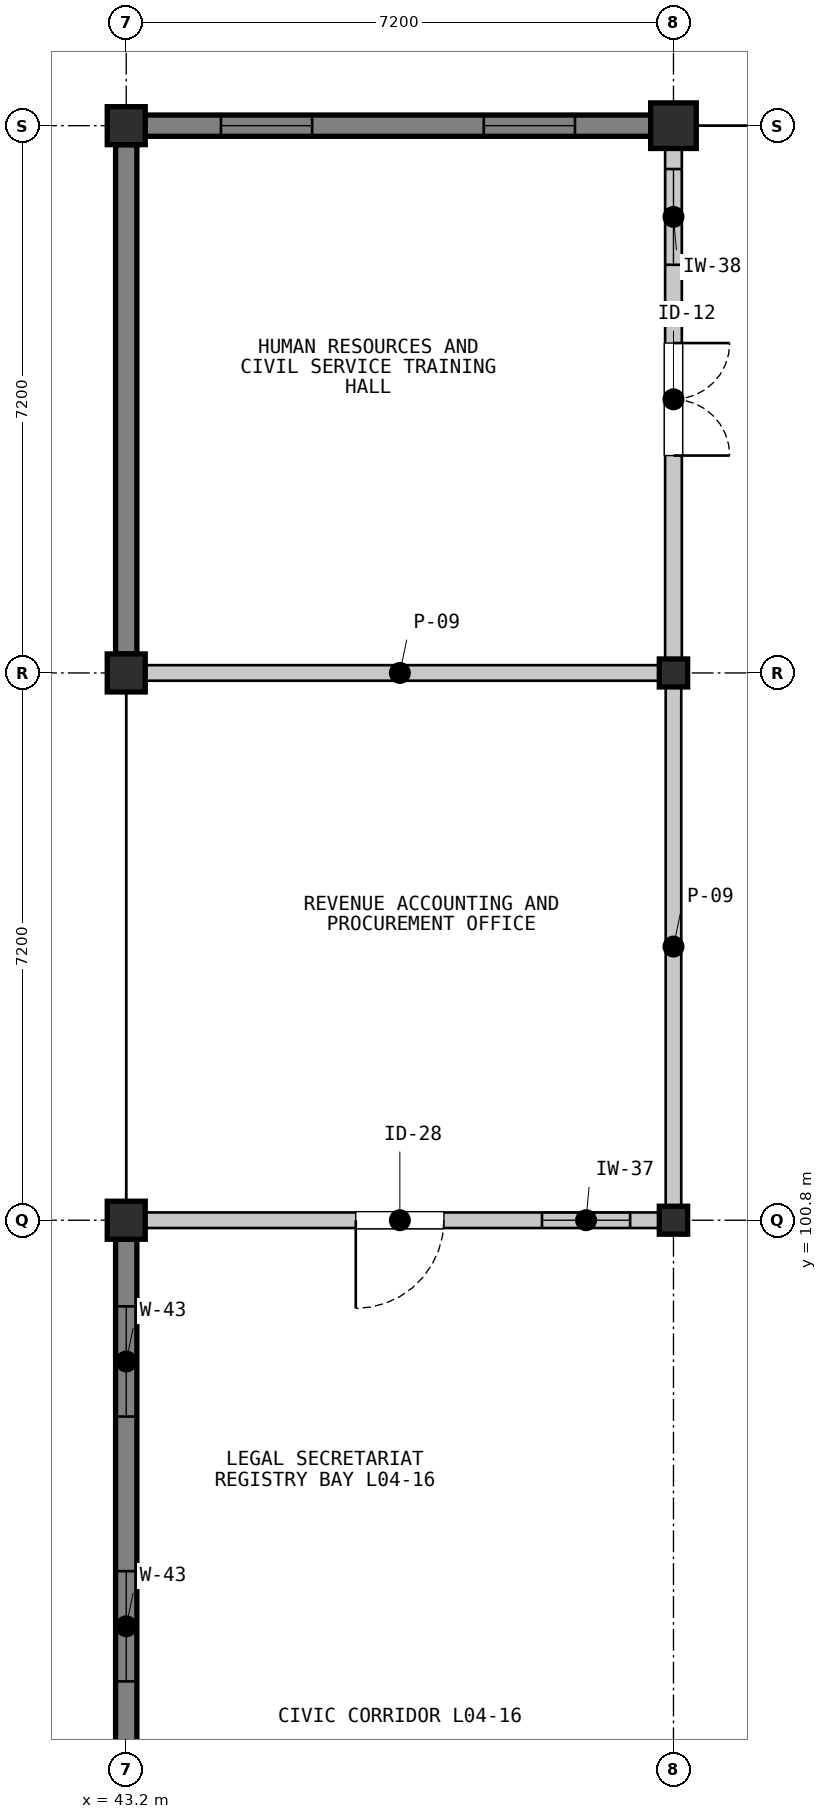
"""IFC4 building model, lengths in metres.
Left out: names, types, materials, properties, quantities, classifications, styles, units other than length and angle.
Written with IfcOpenShell. Run it as: python <this file> out.ifc"""

import sys

from ifc_helpers import new_model, si_unit, direction, frame, frame_2d, origin, origin_2d, place, context, subcontext, project, spatial, rectangle, i_section, extrude, element, fill, save


model = new_model("IFC4")
c1 = context("Model", 3, precision=1e-05, world=origin(), true_north=direction((0.0, 1.0)))
c2 = subcontext(c1, "Body", "Model", "MODEL_VIEW")
j1 = project(units=[si_unit("LENGTHUNIT", "METRE"), si_unit("PLANEANGLEUNIT", "RADIAN")], contexts=[c1])
p1 = place(None, origin())
s1 = spatial("IfcSite", under=j1, at=p1, CompositionType="ELEMENT")
p2 = place(p1, origin())
s2 = spatial("IfcBuilding", under=s1, at=p2, CompositionType="ELEMENT")
p3 = place(p2, frame((0.0, 0.0, 14.1)))
s3 = spatial("IfcBuildingStorey", under=s2, at=p3, CompositionType="ELEMENT", Elevation=14.1)
for number, where, z_axis, x_axis in (
    (1, (43.2, 100.8, 0.0), (0.0, 0.0, 1.0), (1.0, 0.0, 0.0)),
    (2, (43.2, 108.0, 0.0), (0.0, 0.0, 1.0), (1.0, 0.0, 0.0)),
    (3, (43.2, 115.2, 0.0), (0.0, 0.0, 1.0), (1.0, 0.0, 0.0)),
):
    element("IfcColumn", number, at=place(p3, frame(where, z_axis=z_axis, x_axis=x_axis)), inside=s3, PredefinedType="COLUMN", context=c2, shape_type="SweptSolid", body=[
        extrude(rectangle(XDim=0.5, YDim=0.5, at=origin_2d()), origin(), (0.0, 0.0, 1.0), 3.9),
    ])
for number, where, z_axis, x_axis in (
    (4, (50.4, 100.8, 0.0), (0.0, 0.0, 1.0), (1.0, 0.0, 0.0)),
    (5, (50.4, 108.0, 0.0), (0.0, 0.0, 1.0), (1.0, 0.0, 0.0)),
):
    element("IfcColumn", number, at=place(p3, frame(where, z_axis=z_axis, x_axis=x_axis)), inside=s3, PredefinedType="COLUMN", context=c2, shape_type="SweptSolid", body=[
        extrude(i_section(OverallWidth=0.373, OverallDepth=0.368, WebThickness=0.015, FlangeThickness=0.024, FilletRadius=0.015, at=origin_2d()), origin(), (0.0, 0.0, 1.0), 3.9),
    ])
p4 = place(p3, frame((50.4, 115.2, 0.0), z_axis=(0.0, 0.0, 1.0), x_axis=(1.0, 0.0, 0.0)))
e6 = element("IfcColumn", 6, at=p4, inside=s3, PredefinedType="COLUMN", context=c2, shape_type="SweptSolid", body=[
    extrude(rectangle(XDim=0.6, YDim=0.6, at=origin_2d()), origin(), (0.0, 0.0, 1.0), 3.9),
])
p5 = place(p3, frame((43.2, 93.85, 0.0), z_axis=(0.0, 0.0, 1.0), x_axis=(0.0, 1.0, 0.0)))
e7 = element("IfcWall", 7, at=p5, inside=s3, PredefinedType="SOLIDWALL", context=c2, shape_type="SweptSolid", body=[
    extrude(rectangle(XDim=6.7, YDim=0.28, at=frame_2d((3.35, 0.0))), origin(), (0.0, 0.0, 1.0), 3.192),
])
p6 = place(p5, frame((0.883, 0.0, 0.95)))
e8 = element("IfcOpeningElement", 8, at=p6, cuts=e7, PredefinedType="OPENING", context=c2, shape_type="SweptSolid", body=[
    extrude(rectangle(XDim=1.45, YDim=1.85, at=frame_2d((0.725, 0.925))), frame((0.0, 0.15, 0.0), z_axis=(0.0, -1.0, 0.0), x_axis=(1.0, 0.0, 0.0)), (0.0, 0.0, 1.0), 0.3),
])
p7 = place(p5, frame((4.367, 0.0, 0.95)))
e9 = element("IfcOpeningElement", 9, at=p7, cuts=e7, PredefinedType="OPENING", context=c2, shape_type="SweptSolid", body=[
    extrude(rectangle(XDim=1.45, YDim=1.85, at=frame_2d((0.725, 0.925))), frame((0.0, 0.15, 0.0), z_axis=(0.0, -1.0, 0.0), x_axis=(1.0, 0.0, 0.0)), (0.0, 0.0, 1.0), 0.3),
])
p8 = place(p3, frame((43.45, 115.2, 0.0), z_axis=(0.0, 0.0, 1.0), x_axis=(1.0, 0.0, 0.0)))
e10 = element("IfcWall", 10, at=p8, inside=s3, PredefinedType="SOLIDWALL", context=c2, shape_type="SweptSolid", body=[
    extrude(rectangle(XDim=6.65, YDim=0.28, at=frame_2d((3.325, 0.0))), origin(), (0.0, 0.0, 1.0), 3.118),
])
p9 = place(p8, frame((0.996, 0.0, 0.95)))
e11 = element("IfcOpeningElement", 11, at=p9, cuts=e10, PredefinedType="OPENING", context=c2, shape_type="SweptSolid", body=[
    extrude(rectangle(XDim=1.2, YDim=1.7, at=frame_2d((0.6, 0.85))), frame((0.0, 0.15, 0.0), z_axis=(0.0, -1.0, 0.0), x_axis=(1.0, 0.0, 0.0)), (0.0, 0.0, 1.0), 0.3),
])
p10 = place(p8, frame((4.454, 0.0, 0.95)))
e12 = element("IfcOpeningElement", 12, at=p10, cuts=e10, PredefinedType="OPENING", context=c2, shape_type="SweptSolid", body=[
    extrude(rectangle(XDim=1.2, YDim=1.7, at=frame_2d((0.6, 0.85))), frame((0.0, 0.15, 0.0), z_axis=(0.0, -1.0, 0.0), x_axis=(1.0, 0.0, 0.0)), (0.0, 0.0, 1.0), 0.3),
])
p11 = place(p3, frame((43.2, 108.25, 0.0), z_axis=(0.0, 0.0, 1.0), x_axis=(0.0, 1.0, 0.0)))
e13 = element("IfcWall", 13, at=p11, inside=s3, PredefinedType="SOLIDWALL", context=c2, shape_type="SweptSolid", body=[
    extrude(rectangle(XDim=6.7, YDim=0.28, at=frame_2d((3.35, 0.0))), origin(), (0.0, 0.0, 1.0), 3.192),
])
p12 = place(p3, frame((50.28, 100.8, 0.0), z_axis=(0.0, 0.0, 1.0), x_axis=(-1.0, 0.0, 0.0)))
e14 = element("IfcWall", 14, at=p12, inside=s3, PredefinedType="PARTITIONING", context=c2, shape_type="SweptSolid", body=[
    extrude(rectangle(XDim=6.96, YDim=0.205, at=frame_2d((3.48, 0.0))), origin(), (0.0, 0.0, 1.0), 3.108),
])
p13 = place(p12, frame((2.9, 0.0, 0.0)))
e15 = element("IfcOpeningElement", 15, at=p13, cuts=e14, PredefinedType="OPENING", context=c2, shape_type="SweptSolid", body=[
    extrude(rectangle(XDim=1.16, YDim=2.2, at=frame_2d((0.58, 1.1))), frame((0.0, 0.113, 0.0), z_axis=(0.0, -1.0, 0.0), x_axis=(1.0, 0.0, 0.0)), (0.0, 0.0, 1.0), 0.225),
])
p14 = place(p12, frame((0.45, 0.0, 1.05)))
e16 = element("IfcOpeningElement", 16, at=p14, cuts=e14, PredefinedType="OPENING", context=c2, shape_type="SweptSolid", body=[
    extrude(rectangle(XDim=1.16, YDim=1.1, at=frame_2d((0.58, 0.55))), frame((0.0, 0.113, 0.0), z_axis=(0.0, -1.0, 0.0), x_axis=(1.0, 0.0, 0.0)), (0.0, 0.0, 1.0), 0.225),
])
for number, where, z_axis, x_axis in (
    (17, (43.32, 108.0, 0.0), (0.0, 0.0, 1.0), (1.0, 0.0, 0.0)),
    (18, (50.4, 107.88, 0.0), (0.0, 0.0, 1.0), (0.0, -1.0, 0.0)),
):
    element("IfcWall", number, at=place(p3, frame(where, z_axis=z_axis, x_axis=x_axis)), inside=s3, PredefinedType="PARTITIONING", context=c2, shape_type="SweptSolid", body=[
        extrude(rectangle(XDim=6.96, YDim=0.205, at=frame_2d((3.48, 0.0))), origin(), (0.0, 0.0, 1.0), 3.108),
    ])
p15 = place(p3, frame((50.4, 115.08, 0.0), z_axis=(0.0, 0.0, 1.0), x_axis=(0.0, -1.0, 0.0)))
e19 = element("IfcWall", 19, at=p15, inside=s3, PredefinedType="PARTITIONING", context=c2, shape_type="SweptSolid", body=[
    extrude(rectangle(XDim=6.96, YDim=0.22, at=frame_2d((3.48, 0.0))), origin(), (0.0, 0.0, 1.0), 3.108),
])
p16 = place(p15, frame((2.74, 0.0, 0.0)))
e20 = element("IfcOpeningElement", 20, at=p16, cuts=e19, PredefinedType="OPENING", context=c2, shape_type="SweptSolid", body=[
    extrude(rectangle(XDim=1.48, YDim=2.25, at=frame_2d((0.74, 1.125))), frame((0.0, 0.12, 0.0), z_axis=(0.0, -1.0, 0.0), x_axis=(1.0, 0.0, 0.0)), (0.0, 0.0, 1.0), 0.24),
])
p17 = place(p15, frame((0.45, 0.0, 1.05)))
e21 = element("IfcOpeningElement", 21, at=p17, cuts=e19, PredefinedType="OPENING", context=c2, shape_type="SweptSolid", body=[
    extrude(rectangle(XDim=1.26, YDim=1.1, at=frame_2d((0.63, 0.55))), frame((0.0, 0.12, 0.0), z_axis=(0.0, -1.0, 0.0), x_axis=(1.0, 0.0, 0.0)), (0.0, 0.0, 1.0), 0.24),
])
p18 = place(p6, origin())
e22 = element("IfcWindow", 22, at=p18, inside=s3, PartitioningType="SINGLE_PANEL", PredefinedType="WINDOW", context=c2, shape_type="SweptSolid", body=[
    extrude(rectangle(XDim=1.45, YDim=1.85, at=frame_2d((0.725, 0.925))), frame((0.0, 0.03, 0.0), z_axis=(0.0, -1.0, 0.0), x_axis=(1.0, 0.0, 0.0)), (0.0, 0.0, 1.0), 0.06),
])
fill(e8, e22)
p19 = place(p7, origin())
e23 = element("IfcWindow", 23, at=p19, inside=s3, PartitioningType="SINGLE_PANEL", PredefinedType="WINDOW", context=c2, shape_type="SweptSolid", body=[
    extrude(rectangle(XDim=1.45, YDim=1.85, at=frame_2d((0.725, 0.925))), frame((0.0, 0.03, 0.0), z_axis=(0.0, -1.0, 0.0), x_axis=(1.0, 0.0, 0.0)), (0.0, 0.0, 1.0), 0.06),
])
fill(e9, e23)
p20 = place(p9, origin())
e24 = element("IfcWindow", 24, at=p20, inside=s3, PartitioningType="SINGLE_PANEL", PredefinedType="WINDOW", context=c2, shape_type="SweptSolid", body=[
    extrude(rectangle(XDim=1.2, YDim=1.7, at=frame_2d((0.6, 0.85))), frame((0.0, 0.03, 0.0), z_axis=(0.0, -1.0, 0.0), x_axis=(1.0, 0.0, 0.0)), (0.0, 0.0, 1.0), 0.06),
])
fill(e11, e24)
p21 = place(p10, origin())
e25 = element("IfcWindow", 25, at=p21, inside=s3, PartitioningType="SINGLE_PANEL", PredefinedType="WINDOW", context=c2, shape_type="SweptSolid", body=[
    extrude(rectangle(XDim=1.2, YDim=1.7, at=frame_2d((0.6, 0.85))), frame((0.0, 0.03, 0.0), z_axis=(0.0, -1.0, 0.0), x_axis=(1.0, 0.0, 0.0)), (0.0, 0.0, 1.0), 0.06),
])
fill(e12, e25)
p22 = place(p13, origin())
e26 = element("IfcDoor", 26, at=p22, inside=s3, OperationType="SINGLE_SWING_RIGHT", PredefinedType="DOOR", context=c2, shape_type="SweptSolid", body=[
    extrude(rectangle(XDim=1.16, YDim=2.2, at=frame_2d((0.58, 1.1))), frame((0.0, 0.025, 0.0), z_axis=(0.0, -1.0, 0.0), x_axis=(1.0, 0.0, 0.0)), (0.0, 0.0, 1.0), 0.05),
])
fill(e15, e26)
p23 = place(p14, origin())
e27 = element("IfcWindow", 27, at=p23, inside=s3, PartitioningType="SINGLE_PANEL", PredefinedType="WINDOW", context=c2, shape_type="SweptSolid", body=[
    extrude(rectangle(XDim=1.16, YDim=1.1, at=frame_2d((0.58, 0.55))), frame((0.0, 0.03, 0.0), z_axis=(0.0, -1.0, 0.0), x_axis=(1.0, 0.0, 0.0)), (0.0, 0.0, 1.0), 0.06),
])
fill(e16, e27)
p24 = place(p16, origin())
e28 = element("IfcDoor", 28, at=p24, inside=s3, OperationType="DOUBLE_DOOR_SINGLE_SWING", PredefinedType="DOOR", context=c2, shape_type="SweptSolid", body=[
    extrude(rectangle(XDim=1.48, YDim=2.25, at=frame_2d((0.74, 1.125))), frame((0.0, 0.025, 0.0), z_axis=(0.0, -1.0, 0.0), x_axis=(1.0, 0.0, 0.0)), (0.0, 0.0, 1.0), 0.05),
])
fill(e20, e28)
p25 = place(p17, origin())
e29 = element("IfcWindow", 29, at=p25, inside=s3, PartitioningType="SINGLE_PANEL", PredefinedType="WINDOW", context=c2, shape_type="SweptSolid", body=[
    extrude(rectangle(XDim=1.26, YDim=1.1, at=frame_2d((0.63, 0.55))), frame((0.0, 0.03, 0.0), z_axis=(0.0, -1.0, 0.0), x_axis=(1.0, 0.0, 0.0)), (0.0, 0.0, 1.0), 0.06),
])
fill(e21, e29)
save(model, sys.argv[1])
